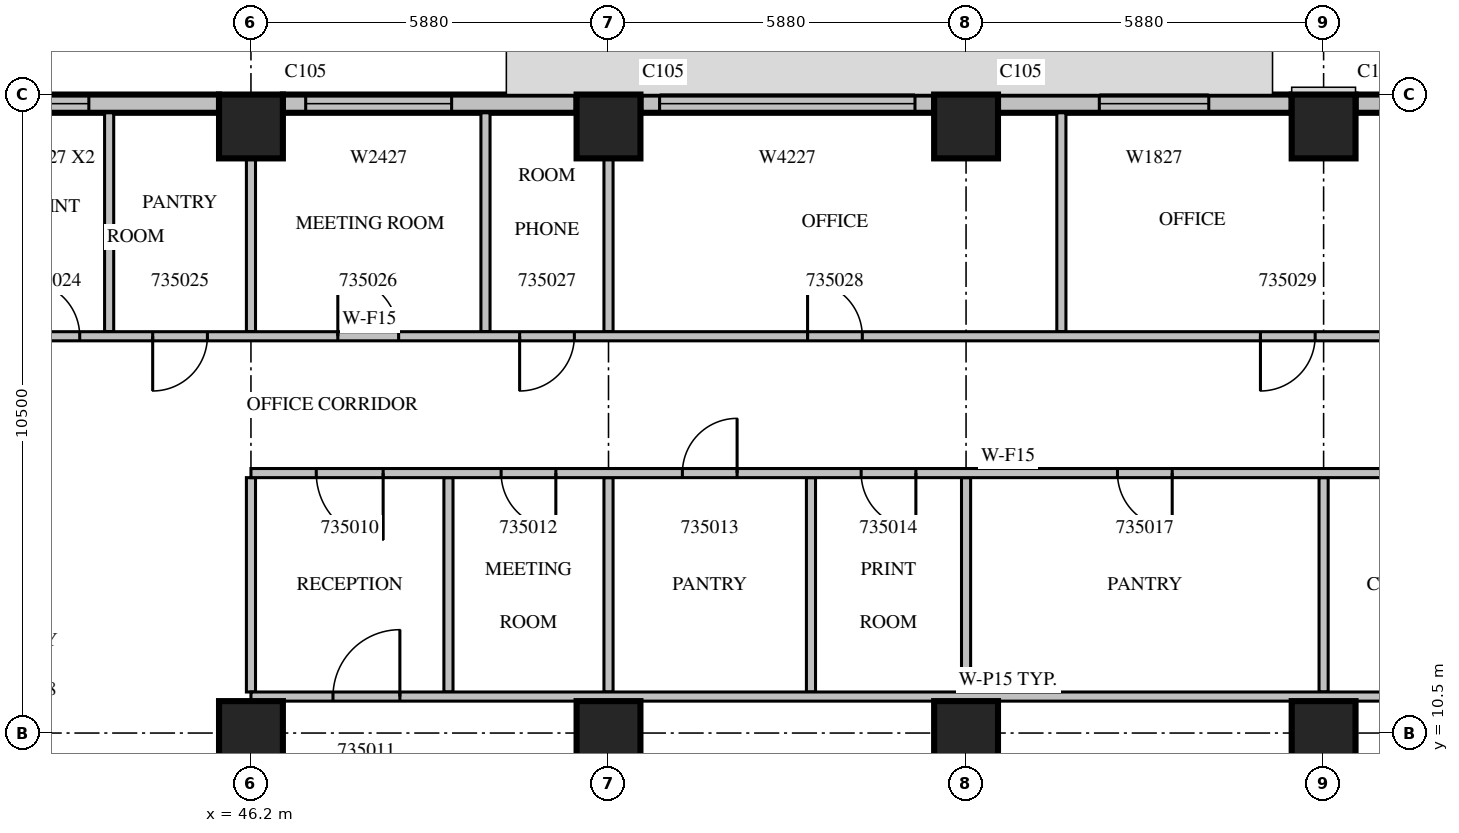
"""IFC4 building model, lengths in metres.
Left out: names, types, materials, properties, quantities, classifications, styles, units other than length and angle.
Written with IfcOpenShell. Run it as: python <this file> out.ifc"""

import sys

from ifc_helpers import new_model, si_unit, direction, frame, frame_2d, origin, origin_2d, place, context, subcontext, project, spatial, rectangle, extrude, source, transform, mapped, element, fill, save


model = new_model("IFC4")
c1 = context("Model", 3, precision=1e-05, world=origin(), true_north=direction((0.0, 1.0)))
c2 = subcontext(c1, "Body", "Model", "MODEL_VIEW")
j1 = project(units=[si_unit("LENGTHUNIT", "METRE"), si_unit("PLANEANGLEUNIT", "RADIAN")], contexts=[c1])
p1 = place(None, origin())
s1 = spatial("IfcSite", under=j1, at=p1, CompositionType="ELEMENT")
p2 = place(p1, origin())
s2 = spatial("IfcBuilding", under=s1, at=p2, CompositionType="ELEMENT")
p3 = place(p2, frame((0.0, 0.0, 158.1)))
s3 = spatial("IfcBuildingStorey", under=s2, at=p3, CompositionType="ELEMENT", Elevation=158.1)
m1 = source(origin(), c2, "Body", "SweptSolid", [
    extrude(rectangle(XDim=1.05, YDim=1.05, at=origin_2d()), origin(), (0.0, 0.0, 1.0), 4.2),
])
for number, where, z_axis, x_axis in (
    (1, (46.2, 10.5, 0.0), (0.0, 0.0, 1.0), (1.0, 0.0, 0.0)),
    (2, (52.08, 10.5, 0.0), (0.0, 0.0, 1.0), (1.0, 0.0, 0.0)),
    (3, (57.96, 10.5, 0.0), (0.0, 0.0, 1.0), (1.0, 0.0, 0.0)),
    (4, (63.84, 10.5, 0.0), (0.0, 0.0, 1.0), (1.0, 0.0, 0.0)),
    (5, (46.2, 20.475, 0.0), (0.0, 0.0, 1.0), (1.0, 0.0, 0.0)),
    (6, (52.08, 20.475, 0.0), (0.0, 0.0, 1.0), (1.0, 0.0, 0.0)),
    (7, (57.96, 20.475, 0.0), (0.0, 0.0, 1.0), (1.0, 0.0, 0.0)),
    (8, (63.84, 20.475, 0.0), (0.0, 0.0, 1.0), (1.0, 0.0, 0.0)),
):
    element("IfcColumn", number, at=place(p3, frame(where, z_axis=z_axis, x_axis=x_axis)), inside=s3, PredefinedType="COLUMN", context=c2, shape_type="MappedRepresentation", body=[
        mapped(m1, transform((0.0, 0.0, 0.0), scale=1.0)),
    ])
m2 = source(origin(), c2, "Body", "SweptSolid", [
    extrude(rectangle(XDim=2.835, YDim=0.3, at=frame_2d((1.417, 0.0))), origin(), (0.0, 0.0, 1.0), 3.8),
])
p4 = place(p3, frame((67.2, 20.85, 0.0), z_axis=(0.0, 0.0, 1.0), x_axis=(-1.0, 0.0, 0.0)))
e9 = element("IfcWall", 9, at=p4, inside=s3, PredefinedType="STANDARD", context=c2, shape_type="MappedRepresentation", body=[
    mapped(m2, transform((0.0, 0.0, 0.0), scale=1.0)),
])
m3 = source(origin(), c2, "Body", "SweptSolid", [
    extrude(rectangle(XDim=1.8, YDim=2.7, at=frame_2d((0.9, 1.35))), frame((0.0, 0.16, 0.0), z_axis=(0.0, -1.0, 0.0), x_axis=(1.0, 0.0, 0.0)), (0.0, 0.0, 1.0), 0.32),
])
p5 = place(p4, frame((0.517, 0.0, 0.6)))
e10 = element("IfcOpeningElement", 10, at=p5, cuts=e9, PredefinedType="OPENING", context=c2, shape_type="MappedRepresentation", body=[
    mapped(m3, transform((0.0, 0.0, 0.0), scale=1.0)),
])
m4 = source(origin(), c2, "Body", "SweptSolid", [
    extrude(rectangle(XDim=4.83, YDim=0.3, at=frame_2d((2.415, 0.0))), origin(), (0.0, 0.0, 1.0), 3.8),
])
p6 = place(p3, frame((63.315, 20.85, 0.0), z_axis=(0.0, 0.0, 1.0), x_axis=(-1.0, 0.0, 0.0)))
e11 = element("IfcWall", 11, at=p6, inside=s3, PredefinedType="STANDARD", context=c2, shape_type="MappedRepresentation", body=[
    mapped(m4, transform((0.0, 0.0, 0.0), scale=1.0)),
])
p7 = place(p6, frame((1.363, 0.0, 0.6)))
e12 = element("IfcOpeningElement", 12, at=p7, cuts=e11, PredefinedType="OPENING", context=c2, shape_type="MappedRepresentation", body=[
    mapped(m3, transform((0.0, 0.0, 0.0), scale=1.0)),
])
p8 = place(p3, frame((57.435, 20.85, 0.0), z_axis=(0.0, 0.0, 1.0), x_axis=(-1.0, 0.0, 0.0)))
e13 = element("IfcWall", 13, at=p8, inside=s3, PredefinedType="STANDARD", context=c2, shape_type="MappedRepresentation", body=[
    mapped(m4, transform((0.0, 0.0, 0.0), scale=1.0)),
])
m5 = source(origin(), c2, "Body", "SweptSolid", [
    extrude(rectangle(XDim=4.2, YDim=2.7, at=frame_2d((2.1, 1.35))), frame((0.0, 0.16, 0.0), z_axis=(0.0, -1.0, 0.0), x_axis=(1.0, 0.0, 0.0)), (0.0, 0.0, 1.0), 0.32),
])
p9 = place(p8, frame((0.315, 0.0, 0.6)))
e14 = element("IfcOpeningElement", 14, at=p9, cuts=e13, PredefinedType="OPENING", context=c2, shape_type="MappedRepresentation", body=[
    mapped(m5, transform((0.0, 0.0, 0.0), scale=1.0)),
])
p10 = place(p3, frame((51.555, 20.85, 0.0), z_axis=(0.0, 0.0, 1.0), x_axis=(-1.0, 0.0, 0.0)))
e15 = element("IfcWall", 15, at=p10, inside=s3, PredefinedType="STANDARD", context=c2, shape_type="MappedRepresentation", body=[
    mapped(m4, transform((0.0, 0.0, 0.0), scale=1.0)),
])
m6 = source(origin(), c2, "Body", "SweptSolid", [
    extrude(rectangle(XDim=2.4, YDim=2.7, at=frame_2d((1.2, 1.35))), frame((0.0, 0.16, 0.0), z_axis=(0.0, -1.0, 0.0), x_axis=(1.0, 0.0, 0.0)), (0.0, 0.0, 1.0), 0.32),
])
p11 = place(p10, frame((2.055, 0.0, 0.6)))
e16 = element("IfcOpeningElement", 16, at=p11, cuts=e15, PredefinedType="OPENING", context=c2, shape_type="MappedRepresentation", body=[
    mapped(m6, transform((0.0, 0.0, 0.0), scale=1.0)),
])
m7 = source(origin(), c2, "Body", "SweptSolid", [
    extrude(rectangle(XDim=7.35, YDim=0.3, at=frame_2d((3.675, 0.0))), origin(), (0.0, 0.0, 1.0), 3.8),
])
p12 = place(p3, frame((45.675, 20.85, 0.0), z_axis=(0.0, 0.0, 1.0), x_axis=(-1.0, 0.0, 0.0)))
e17 = element("IfcWall", 17, at=p12, inside=s3, PredefinedType="STANDARD", context=c2, shape_type="MappedRepresentation", body=[
    mapped(m7, transform((0.0, 0.0, 0.0), scale=1.0)),
])
m8 = source(origin(), c2, "Body", "SweptSolid", [
    extrude(rectangle(XDim=1.2, YDim=2.7, at=frame_2d((0.6, 1.35))), frame((0.0, 0.16, 0.0), z_axis=(0.0, -1.0, 0.0), x_axis=(1.0, 0.0, 0.0)), (0.0, 0.0, 1.0), 0.32),
])
p13 = place(p12, frame((2.141, 0.0, 0.6)))
e18 = element("IfcOpeningElement", 18, at=p13, cuts=e17, PredefinedType="OPENING", context=c2, shape_type="MappedRepresentation", body=[
    mapped(m8, transform((0.0, 0.0, 0.0), scale=1.0)),
])
p14 = place(p12, frame((5.538, 0.0, 0.6)))
e19 = element("IfcOpeningElement", 19, at=p14, cuts=e17, PredefinedType="OPENING", context=c2, shape_type="MappedRepresentation", body=[
    mapped(m8, transform((0.0, 0.0, 0.0), scale=1.0)),
])
m9 = source(origin(), c2, "Body", "SweptSolid", [
    extrude(rectangle(XDim=3.525, YDim=0.15, at=frame_2d((1.762, 0.0))), origin(), (0.0, 0.0, 1.0), 3.8),
])
for number, where, z_axis, x_axis in (
    (20, (49.448, 11.175, 0.0), (0.0, 0.0, 1.0), (0.0, 1.0, 0.0)),
    (21, (52.08, 11.175, 0.0), (0.0, 0.0, 1.0), (0.0, 1.0, 0.0)),
    (22, (55.41, 11.175, 0.0), (0.0, 0.0, 1.0), (0.0, 1.0, 0.0)),
    (23, (63.84, 11.175, 0.0), (0.0, 0.0, 1.0), (0.0, 1.0, 0.0)),
    (24, (46.2, 11.175, 0.0), (0.0, 0.0, 1.0), (0.0, 1.0, 0.0)),
    (25, (57.96, 11.175, 0.0), (0.0, 0.0, 1.0), (0.0, 1.0, 0.0)),
):
    element("IfcWall", number, at=place(p3, frame(where, z_axis=z_axis, x_axis=x_axis)), inside=s3, PredefinedType="PARTITIONING", context=c2, shape_type="MappedRepresentation", body=[
        mapped(m9, transform((0.0, 0.0, 0.0), scale=1.0)),
    ])
m10 = source(origin(), c2, "Body", "SweptSolid", [
    extrude(rectangle(XDim=24.9, YDim=0.15, at=frame_2d((12.45, 0.0))), origin(), (0.0, 0.0, 1.0), 3.8),
])
p15 = place(p3, frame((71.1, 11.1, 0.0), z_axis=(0.0, 0.0, 1.0), x_axis=(-1.0, 0.0, 0.0)))
e26 = element("IfcWall", 26, at=p15, inside=s3, PredefinedType="PARTITIONING", context=c2, shape_type="MappedRepresentation", body=[
    mapped(m10, transform((0.0, 0.0, 0.0), scale=1.0)),
])
m11 = source(origin(), c2, "Body", "SweptSolid", [
    extrude(rectangle(XDim=1.1, YDim=2.1, at=frame_2d((0.55, 1.05))), frame((0.0, 0.085, 0.0), z_axis=(0.0, -1.0, 0.0), x_axis=(1.0, 0.0, 0.0)), (0.0, 0.0, 1.0), 0.17),
])
p16 = place(p15, frame((22.451, 0.0, 0.0)))
e27 = element("IfcOpeningElement", 27, at=p16, cuts=e26, PredefinedType="OPENING", context=c2, shape_type="MappedRepresentation", body=[
    mapped(m11, transform((0.0, 0.0, 0.0), scale=1.0)),
])
p17 = place(p15, frame((2.041, 0.0, 0.0)))
e28 = element("IfcOpeningElement", 28, at=p17, cuts=e26, PredefinedType="OPENING", context=c2, shape_type="MappedRepresentation", body=[
    mapped(m11, transform((0.0, 0.0, 0.0), scale=1.0)),
])
m12 = source(origin(), c2, "Body", "SweptSolid", [
    extrude(rectangle(XDim=3.6, YDim=0.15, at=frame_2d((1.8, 0.0))), origin(), (0.0, 0.0, 1.0), 3.8),
])
for number, where, z_axis, x_axis in (
    (29, (43.868, 20.7, 0.0), (0.0, 0.0, 1.0), (0.0, -1.0, 0.0)),
    (30, (50.057, 20.7, 0.0), (0.0, 0.0, 1.0), (0.0, -1.0, 0.0)),
    (31, (59.528, 20.7, 0.0), (0.0, 0.0, 1.0), (0.0, -1.0, 0.0)),
):
    element("IfcWall", number, at=place(p3, frame(where, z_axis=z_axis, x_axis=x_axis)), inside=s3, PredefinedType="PARTITIONING", context=c2, shape_type="MappedRepresentation", body=[
        mapped(m12, transform((0.0, 0.0, 0.0), scale=1.0)),
    ])
m13 = source(origin(), c2, "Body", "SweptSolid", [
    extrude(rectangle(XDim=2.851, YDim=0.15, at=frame_2d((1.425, 0.0))), origin(), (0.0, 0.0, 1.0), 3.8),
])
for number, where, z_axis, x_axis in (
    (32, (46.2, 17.1, 0.0), (0.0, 0.0, 1.0), (0.0, 1.0, 0.0)),
    (33, (52.08, 17.1, 0.0), (0.0, 0.0, 1.0), (0.0, 1.0, 0.0)),
):
    element("IfcWall", number, at=place(p3, frame(where, z_axis=z_axis, x_axis=x_axis)), inside=s3, PredefinedType="PARTITIONING", context=c2, shape_type="MappedRepresentation", body=[
        mapped(m13, transform((0.0, 0.0, 0.0), scale=1.0)),
    ])
p18 = place(p3, frame((71.1, 14.775, 0.0), z_axis=(0.0, 0.0, 1.0), x_axis=(-1.0, 0.0, 0.0)))
e34 = element("IfcWall", 34, at=p18, inside=s3, PredefinedType="PARTITIONING", context=c2, shape_type="MappedRepresentation", body=[
    mapped(m10, transform((0.0, 0.0, 0.0), scale=1.0)),
])
p19 = place(p18, frame((22.726, 0.0, 0.0)))
e35 = element("IfcOpeningElement", 35, at=p19, cuts=e34, PredefinedType="OPENING", context=c2, shape_type="MappedRepresentation", body=[
    mapped(m11, transform((0.0, 0.0, 0.0), scale=1.0)),
])
m14 = source(origin(), c2, "Body", "SweptSolid", [
    extrude(rectangle(XDim=0.9, YDim=2.1, at=frame_2d((0.45, 1.05))), frame((0.0, 0.085, 0.0), z_axis=(0.0, -1.0, 0.0), x_axis=(1.0, 0.0, 0.0)), (0.0, 0.0, 1.0), 0.17),
])
p20 = place(p18, frame((19.886, 0.0, 0.0)))
e36 = element("IfcOpeningElement", 36, at=p20, cuts=e34, PredefinedType="OPENING", context=c2, shape_type="MappedRepresentation", body=[
    mapped(m14, transform((0.0, 0.0, 0.0), scale=1.0)),
])
p21 = place(p18, frame((16.905, 0.0, 0.0)))
e37 = element("IfcOpeningElement", 37, at=p21, cuts=e34, PredefinedType="OPENING", context=c2, shape_type="MappedRepresentation", body=[
    mapped(m14, transform((0.0, 0.0, 0.0), scale=1.0)),
])
p22 = place(p18, frame((13.965, 0.0, 0.0)))
e38 = element("IfcOpeningElement", 38, at=p22, cuts=e34, PredefinedType="OPENING", context=c2, shape_type="MappedRepresentation", body=[
    mapped(m14, transform((0.0, 0.0, 0.0), scale=1.0)),
])
p23 = place(p18, frame((1.088, 0.0, 0.0)))
e39 = element("IfcOpeningElement", 39, at=p23, cuts=e34, PredefinedType="OPENING", context=c2, shape_type="MappedRepresentation", body=[
    mapped(m11, transform((0.0, 0.0, 0.0), scale=1.0)),
])
p24 = place(p18, frame((9.75, 0.0, 0.0)))
e40 = element("IfcOpeningElement", 40, at=p24, cuts=e34, PredefinedType="OPENING", context=c2, shape_type="MappedRepresentation", body=[
    mapped(m14, transform((0.0, 0.0, 0.0), scale=1.0)),
])
p25 = place(p18, frame((4.856, 0.0, 0.0)))
e41 = element("IfcOpeningElement", 41, at=p25, cuts=e34, PredefinedType="OPENING", context=c2, shape_type="MappedRepresentation", body=[
    mapped(m14, transform((0.0, 0.0, 0.0), scale=1.0)),
])
m15 = source(origin(), c2, "Body", "SweptSolid", [
    extrude(rectangle(XDim=37.5, YDim=0.15, at=frame_2d((18.75, 0.0))), origin(), (0.0, 0.0, 1.0), 3.8),
])
p26 = place(p3, frame((29.4, 17.025, 0.0), z_axis=(0.0, 0.0, 1.0), x_axis=(1.0, 0.0, 0.0)))
e42 = element("IfcWall", 42, at=p26, inside=s3, PredefinedType="PARTITIONING", context=c2, shape_type="MappedRepresentation", body=[
    mapped(m15, transform((0.0, 0.0, 0.0), scale=1.0)),
])
m16 = source(origin(), c2, "Body", "SweptSolid", [
    extrude(rectangle(XDim=1.0, YDim=2.1, at=frame_2d((0.5, 1.05))), frame((0.0, 0.085, 0.0), z_axis=(0.0, -1.0, 0.0), x_axis=(1.0, 0.0, 0.0)), (0.0, 0.0, 1.0), 0.17),
])
p27 = place(p26, frame((1.357, 0.0, 0.0)))
e43 = element("IfcOpeningElement", 43, at=p27, cuts=e42, PredefinedType="OPENING", context=c2, shape_type="MappedRepresentation", body=[
    mapped(m16, transform((0.0, 0.0, 0.0), scale=1.0)),
])
p28 = place(p26, frame((4.669, 0.0, 0.0)))
e44 = element("IfcOpeningElement", 44, at=p28, cuts=e42, PredefinedType="OPENING", context=c2, shape_type="MappedRepresentation", body=[
    mapped(m16, transform((0.0, 0.0, 0.0), scale=1.0)),
])
p29 = place(p26, frame((7.012, 0.0, 0.0)))
e45 = element("IfcOpeningElement", 45, at=p29, cuts=e42, PredefinedType="OPENING", context=c2, shape_type="MappedRepresentation", body=[
    mapped(m16, transform((0.0, 0.0, 0.0), scale=1.0)),
])
p30 = place(p26, frame((9.274, 0.0, 0.0)))
e46 = element("IfcOpeningElement", 46, at=p30, cuts=e42, PredefinedType="OPENING", context=c2, shape_type="MappedRepresentation", body=[
    mapped(m16, transform((0.0, 0.0, 0.0), scale=1.0)),
])
p31 = place(p26, frame((11.424, 0.0, 0.0)))
e47 = element("IfcOpeningElement", 47, at=p31, cuts=e42, PredefinedType="OPENING", context=c2, shape_type="MappedRepresentation", body=[
    mapped(m14, transform((0.0, 0.0, 0.0), scale=1.0)),
])
p32 = place(p26, frame((13.084, 0.0, 0.0)))
e48 = element("IfcOpeningElement", 48, at=p32, cuts=e42, PredefinedType="OPENING", context=c2, shape_type="MappedRepresentation", body=[
    mapped(m14, transform((0.0, 0.0, 0.0), scale=1.0)),
])
p33 = place(p26, frame((15.184, 0.0, 0.0)))
e49 = element("IfcOpeningElement", 49, at=p33, cuts=e42, PredefinedType="OPENING", context=c2, shape_type="MappedRepresentation", body=[
    mapped(m14, transform((0.0, 0.0, 0.0), scale=1.0)),
])
p34 = place(p26, frame((18.228, 0.0, 0.0)))
e50 = element("IfcOpeningElement", 50, at=p34, cuts=e42, PredefinedType="OPENING", context=c2, shape_type="MappedRepresentation", body=[
    mapped(m16, transform((0.0, 0.0, 0.0), scale=1.0)),
])
p35 = place(p26, frame((21.218, 0.0, 0.0)))
e51 = element("IfcOpeningElement", 51, at=p35, cuts=e42, PredefinedType="OPENING", context=c2, shape_type="MappedRepresentation", body=[
    mapped(m14, transform((0.0, 0.0, 0.0), scale=1.0)),
])
p36 = place(p26, frame((25.954, 0.0, 0.0)))
e52 = element("IfcOpeningElement", 52, at=p36, cuts=e42, PredefinedType="OPENING", context=c2, shape_type="MappedRepresentation", body=[
    mapped(m14, transform((0.0, 0.0, 0.0), scale=1.0)),
])
p37 = place(p26, frame((33.401, 0.0, 0.0)))
e53 = element("IfcOpeningElement", 53, at=p37, cuts=e42, PredefinedType="OPENING", context=c2, shape_type="MappedRepresentation", body=[
    mapped(m14, transform((0.0, 0.0, 0.0), scale=1.0)),
])
m17 = source(origin(), c2, "Body", "SweptSolid", [
    extrude(rectangle(XDim=1.8, YDim=2.7, at=frame_2d((0.9, 1.35))), frame((0.0, 0.03, 0.0), z_axis=(0.0, -1.0, 0.0), x_axis=(1.0, 0.0, 0.0)), (0.0, 0.0, 1.0), 0.06),
])
p38 = place(p7, origin())
e54 = element("IfcWindow", 54, at=p38, inside=s3, PartitioningType="SINGLE_PANEL", PredefinedType="WINDOW", context=c2, shape_type="MappedRepresentation", body=[
    mapped(m17, transform((0.0, 0.0, 0.0), scale=1.0)),
])
fill(e12, e54)
m18 = source(origin(), c2, "Body", "SweptSolid", [
    extrude(rectangle(XDim=2.4, YDim=2.7, at=frame_2d((1.2, 1.35))), frame((0.0, 0.03, 0.0), z_axis=(0.0, -1.0, 0.0), x_axis=(1.0, 0.0, 0.0)), (0.0, 0.0, 1.0), 0.06),
])
p39 = place(p11, origin())
e55 = element("IfcWindow", 55, at=p39, inside=s3, PartitioningType="SINGLE_PANEL", PredefinedType="WINDOW", context=c2, shape_type="MappedRepresentation", body=[
    mapped(m18, transform((0.0, 0.0, 0.0), scale=1.0)),
])
fill(e16, e55)
m19 = source(origin(), c2, "Body", "SweptSolid", [
    extrude(rectangle(XDim=4.2, YDim=2.7, at=frame_2d((2.1, 1.35))), frame((0.0, 0.03, 0.0), z_axis=(0.0, -1.0, 0.0), x_axis=(1.0, 0.0, 0.0)), (0.0, 0.0, 1.0), 0.06),
])
p40 = place(p9, origin())
e56 = element("IfcWindow", 56, at=p40, inside=s3, PartitioningType="SINGLE_PANEL", PredefinedType="WINDOW", context=c2, shape_type="MappedRepresentation", body=[
    mapped(m19, transform((0.0, 0.0, 0.0), scale=1.0)),
])
fill(e14, e56)
m20 = source(origin(), c2, "Body", "SweptSolid", [
    extrude(rectangle(XDim=1.2, YDim=2.7, at=frame_2d((0.6, 1.35))), frame((0.0, 0.03, 0.0), z_axis=(0.0, -1.0, 0.0), x_axis=(1.0, 0.0, 0.0)), (0.0, 0.0, 1.0), 0.06),
])
p41 = place(p13, origin())
e57 = element("IfcWindow", 57, at=p41, inside=s3, PartitioningType="SINGLE_PANEL", PredefinedType="WINDOW", context=c2, shape_type="MappedRepresentation", body=[
    mapped(m20, transform((0.0, 0.0, 0.0), scale=1.0)),
])
fill(e18, e57)
m21 = source(origin(), c2, "Body", "SweptSolid", [
    extrude(rectangle(XDim=1.1, YDim=2.1, at=frame_2d((0.55, 1.05))), frame((0.0, 0.025, 0.0), z_axis=(0.0, -1.0, 0.0), x_axis=(1.0, 0.0, 0.0)), (0.0, 0.0, 1.0), 0.05),
])
p42 = place(p19, origin())
e58 = element("IfcDoor", 58, at=p42, inside=s3, OperationType="SINGLE_SWING_LEFT", PredefinedType="DOOR", context=c2, shape_type="MappedRepresentation", body=[
    mapped(m21, transform((0.0, 0.0, 0.0), scale=1.0)),
])
fill(e35, e58)
p43 = place(p16, origin())
e59 = element("IfcDoor", 59, at=p43, inside=s3, OperationType="SINGLE_SWING_RIGHT", PredefinedType="DOOR", context=c2, shape_type="MappedRepresentation", body=[
    mapped(m21, transform((0.0, 0.0, 0.0), scale=1.0)),
])
fill(e27, e59)
m22 = source(origin(), c2, "Body", "SweptSolid", [
    extrude(rectangle(XDim=0.9, YDim=2.1, at=frame_2d((0.45, 1.05))), frame((0.0, 0.025, 0.0), z_axis=(0.0, -1.0, 0.0), x_axis=(1.0, 0.0, 0.0)), (0.0, 0.0, 1.0), 0.05),
])
p44 = place(p20, origin())
e60 = element("IfcDoor", 60, at=p44, inside=s3, OperationType="SINGLE_SWING_LEFT", PredefinedType="DOOR", context=c2, shape_type="MappedRepresentation", body=[
    mapped(m22, transform((0.0, 0.0, 0.0), scale=1.0)),
])
fill(e36, e60)
p45 = place(p21, origin())
e61 = element("IfcDoor", 61, at=p45, inside=s3, OperationType="SINGLE_SWING_RIGHT", PredefinedType="DOOR", context=c2, shape_type="MappedRepresentation", body=[
    mapped(m22, transform((0.0, 0.0, 0.0), scale=1.0)),
])
fill(e37, e61)
p46 = place(p22, origin())
e62 = element("IfcDoor", 62, at=p46, inside=s3, OperationType="SINGLE_SWING_LEFT", PredefinedType="DOOR", context=c2, shape_type="MappedRepresentation", body=[
    mapped(m22, transform((0.0, 0.0, 0.0), scale=1.0)),
])
fill(e38, e62)
p47 = place(p24, origin())
e63 = element("IfcDoor", 63, at=p47, inside=s3, OperationType="SINGLE_SWING_LEFT", PredefinedType="DOOR", context=c2, shape_type="MappedRepresentation", body=[
    mapped(m22, transform((0.0, 0.0, 0.0), scale=1.0)),
])
fill(e40, e63)
p48 = place(p32, origin())
e64 = element("IfcDoor", 64, at=p48, inside=s3, OperationType="SINGLE_SWING_LEFT", PredefinedType="DOOR", context=c2, shape_type="MappedRepresentation", body=[
    mapped(m22, transform((0.0, 0.0, 0.0), scale=1.0)),
])
fill(e48, e64)
p49 = place(p33, origin())
e65 = element("IfcDoor", 65, at=p49, inside=s3, OperationType="SINGLE_SWING_RIGHT", PredefinedType="DOOR", context=c2, shape_type="MappedRepresentation", body=[
    mapped(m22, transform((0.0, 0.0, 0.0), scale=1.0)),
])
fill(e49, e65)
m23 = source(origin(), c2, "Body", "SweptSolid", [
    extrude(rectangle(XDim=1.0, YDim=2.1, at=frame_2d((0.5, 1.05))), frame((0.0, 0.025, 0.0), z_axis=(0.0, -1.0, 0.0), x_axis=(1.0, 0.0, 0.0)), (0.0, 0.0, 1.0), 0.05),
])
p50 = place(p34, origin())
e66 = element("IfcDoor", 66, at=p50, inside=s3, OperationType="SINGLE_SWING_LEFT", PredefinedType="DOOR", context=c2, shape_type="MappedRepresentation", body=[
    mapped(m23, transform((0.0, 0.0, 0.0), scale=1.0)),
])
fill(e50, e66)
p51 = place(p35, origin())
e67 = element("IfcDoor", 67, at=p51, inside=s3, OperationType="SINGLE_SWING_RIGHT", PredefinedType="DOOR", context=c2, shape_type="MappedRepresentation", body=[
    mapped(m22, transform((0.0, 0.0, 0.0), scale=1.0)),
])
fill(e51, e67)
p52 = place(p36, origin())
e68 = element("IfcDoor", 68, at=p52, inside=s3, OperationType="SINGLE_SWING_LEFT", PredefinedType="DOOR", context=c2, shape_type="MappedRepresentation", body=[
    mapped(m22, transform((0.0, 0.0, 0.0), scale=1.0)),
])
fill(e52, e68)
p53 = place(p37, origin())
e69 = element("IfcDoor", 69, at=p53, inside=s3, OperationType="SINGLE_SWING_RIGHT", PredefinedType="DOOR", context=c2, shape_type="MappedRepresentation", body=[
    mapped(m22, transform((0.0, 0.0, 0.0), scale=1.0)),
])
fill(e53, e69)
save(model, sys.argv[1])
